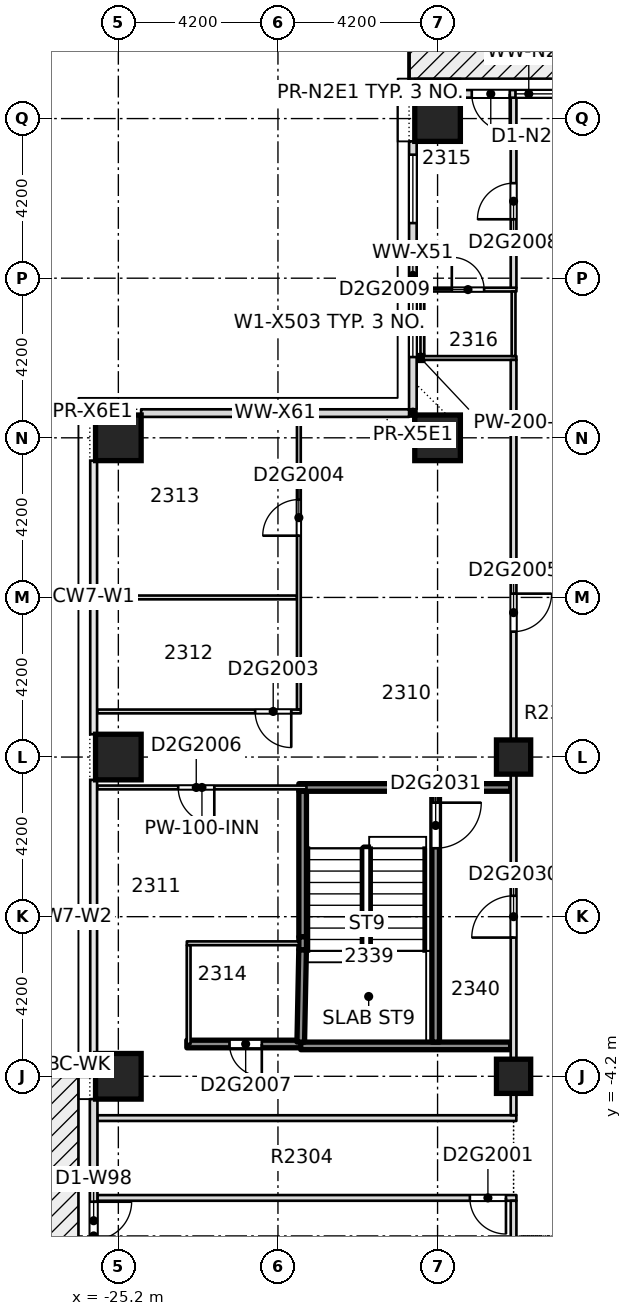
"""IFC4 building model, lengths in metres.
Left out: names, types, materials, properties, quantities, classifications, styles, units other than length and angle.
Written with IfcOpenShell. Run it as: python <this file> out.ifc"""

import sys

from ifc_helpers import new_model, si_unit, direction, frame, frame_2d, origin, origin_2d, place, context, subcontext, project, spatial, rectangle, extrude, element, fill, save


model = new_model("IFC4")
c1 = context("Model", 3, precision=1e-05, world=origin(), true_north=direction((0.0, 1.0)))
c2 = subcontext(c1, "Body", "Model", "MODEL_VIEW")
j1 = project(units=[si_unit("LENGTHUNIT", "METRE"), si_unit("PLANEANGLEUNIT", "RADIAN")], contexts=[c1])
p1 = place(None, origin())
s1 = spatial("IfcSite", under=j1, at=p1, CompositionType="ELEMENT")
p2 = place(p1, origin())
s2 = spatial("IfcBuilding", under=s1, at=p2, CompositionType="ELEMENT")
p3 = place(p2, frame((0.0, 0.0, 94.2)))
s3 = spatial("IfcBuildingStorey", under=s2, at=p3, CompositionType="ELEMENT", Elevation=94.2)
for number, where, z_axis, x_axis in (
    (1, (-25.2, -4.2, -0.32), (0.0, 0.0, 1.0), (1.0, 0.0, 0.0)),
    (2, (-25.2, 4.2, -0.32), (0.0, 0.0, 1.0), (1.0, 0.0, 0.0)),
    (3, (-25.2, 12.6, -0.32), (0.0, 0.0, 1.0), (1.0, 0.0, 0.0)),
    (4, (-16.8, 12.6, -0.32), (0.0, 0.0, 1.0), (1.0, 0.0, 0.0)),
    (5, (-16.8, 21.0, -0.32), (0.0, 0.0, 1.0), (1.0, 0.0, 0.0)),
):
    element("IfcColumn", number, at=place(p3, frame(where, z_axis=z_axis, x_axis=x_axis)), inside=s3, PredefinedType="COLUMN", context=c2, shape_type="SweptSolid", body=[
        extrude(rectangle(XDim=1.2, YDim=1.2, at=origin_2d()), origin(), (0.0, 0.0, 1.0), 3.45),
    ])
for number, where, z_axis, x_axis in (
    (6, (-14.8, -4.2, -0.32), (0.0, 0.0, 1.0), (1.0, 0.0, 0.0)),
    (7, (-14.8, 4.2, -0.32), (0.0, 0.0, 1.0), (1.0, 0.0, 0.0)),
):
    element("IfcColumn", number, at=place(p3, frame(where, z_axis=z_axis, x_axis=x_axis)), inside=s3, PredefinedType="COLUMN", context=c2, shape_type="SweptSolid", body=[
        extrude(rectangle(XDim=0.9, YDim=0.9, at=origin_2d()), origin(), (0.0, 0.0, 1.0), 3.45),
    ])
p4 = place(p3, frame((-25.75, -7.4, 0.0), z_axis=(0.0, 0.0, 1.0), x_axis=(1.0, 0.0, 0.0)))
e8 = element("IfcWall", 8, at=p4, inside=s3, PredefinedType="PARTITIONING", context=c2, shape_type="SweptSolid", body=[
    extrude(rectangle(XDim=11.025, YDim=0.15, at=frame_2d((5.512, 0.0))), origin(), (0.0, 0.0, 1.0), 3.13),
])
p5 = place(p4, frame((9.8, 0.0, 0.0)))
e9 = element("IfcOpeningElement", 9, at=p5, cuts=e8, PredefinedType="OPENING", context=c2, shape_type="SweptSolid", body=[
    extrude(rectangle(XDim=0.95, YDim=2.1, at=frame_2d((0.475, 1.05))), frame((0.0, 0.085, 0.0), z_axis=(0.0, -1.0, 0.0), x_axis=(1.0, 0.0, 0.0)), (0.0, 0.0, 1.0), 0.17),
])
p6 = place(p3, frame((-25.75, -5.3, 0.0), z_axis=(0.0, 0.0, 1.0), x_axis=(1.0, 0.0, 0.0)))
e10 = element("IfcWall", 10, at=p6, inside=s3, PredefinedType="PARTITIONING", context=c2, shape_type="SweptSolid", body=[
    extrude(rectangle(XDim=11.023, YDim=0.15, at=frame_2d((5.511, 0.0))), origin(), (0.0, 0.0, 1.0), 3.13),
])
p7 = place(p3, frame((-23.398, -3.35, 0.0), z_axis=(0.0, 0.0, 1.0), x_axis=(1.0, 0.0, 0.0)))
e11 = element("IfcWall", 11, at=p7, inside=s3, PredefinedType="SOLIDWALL", context=c2, shape_type="SweptSolid", body=[
    extrude(rectangle(XDim=3.098, YDim=0.2, at=frame_2d((1.549, 0.0))), origin(), (0.0, 0.0, 1.0), 3.13),
])
p8 = place(p7, frame((1.123, 0.0, 0.0)))
e12 = element("IfcOpeningElement", 12, at=p8, cuts=e11, PredefinedType="OPENING", context=c2, shape_type="SweptSolid", body=[
    extrude(rectangle(XDim=0.85, YDim=2.1, at=frame_2d((0.425, 1.05))), frame((0.0, 0.11, 0.0), z_axis=(0.0, -1.0, 0.0), x_axis=(1.0, 0.0, 0.0)), (0.0, 0.0, 1.0), 0.22),
])
p9 = place(p3, frame((-20.4, -3.4, 0.0), z_axis=(0.0, 0.0, 1.0), x_axis=(1.0, 0.0, 0.0)))
e13 = element("IfcWall", 13, at=p9, inside=s3, PredefinedType="SOLIDWALL", context=c2, shape_type="SweptSolid", body=[
    extrude(rectangle(XDim=5.523, YDim=0.2, at=frame_2d((2.761, 0.0))), origin(), (0.0, 0.0, 1.0), 3.13),
])
p10 = place(p3, frame((-23.398, -0.7, 0.0), z_axis=(0.0, 0.0, 1.0), x_axis=(1.0, 0.0, 0.0)))
e14 = element("IfcWall", 14, at=p10, inside=s3, PredefinedType="PARTITIONING", context=c2, shape_type="SweptSolid", body=[
    extrude(rectangle(XDim=2.948, YDim=0.1, at=frame_2d((1.474, 0.0))), origin(), (0.0, 0.0, 1.0), 3.13),
])
p11 = place(p3, frame((-25.75, 3.4, 0.0), z_axis=(0.0, 0.0, 1.0), x_axis=(1.0, 0.0, 0.0)))
e15 = element("IfcWall", 15, at=p11, inside=s3, PredefinedType="PARTITIONING", context=c2, shape_type="SweptSolid", body=[
    extrude(rectangle(XDim=5.5, YDim=0.1, at=frame_2d((2.75, 0.0))), origin(), (0.0, 0.0, 1.0), 3.13),
])
p12 = place(p11, frame((2.125, 0.0, 0.0)))
e16 = element("IfcOpeningElement", 16, at=p12, cuts=e15, PredefinedType="OPENING", context=c2, shape_type="SweptSolid", body=[
    extrude(rectangle(XDim=0.95, YDim=2.1, at=frame_2d((0.475, 1.05))), frame((0.0, 0.06, 0.0), z_axis=(0.0, -1.0, 0.0), x_axis=(1.0, 0.0, 0.0)), (0.0, 0.0, 1.0), 0.12),
])
p13 = place(p3, frame((-20.45, 3.4, 0.0), z_axis=(0.0, 0.0, 1.0), x_axis=(1.0, 0.0, 0.0)))
e17 = element("IfcWall", 17, at=p13, inside=s3, PredefinedType="SOLIDWALL", context=c2, shape_type="SweptSolid", body=[
    extrude(rectangle(XDim=5.575, YDim=0.2, at=frame_2d((2.788, 0.0))), origin(), (0.0, 0.0, 1.0), 3.13),
])
p14 = place(p3, frame((-25.75, 5.4, 0.0), z_axis=(0.0, 0.0, 1.0), x_axis=(1.0, 0.0, 0.0)))
e18 = element("IfcWall", 18, at=p14, inside=s3, PredefinedType="PARTITIONING", context=c2, shape_type="SweptSolid", body=[
    extrude(rectangle(XDim=5.35, YDim=0.1, at=frame_2d((2.675, 0.0))), origin(), (0.0, 0.0, 1.0), 3.13),
])
p15 = place(p14, frame((4.15, 0.0, 0.0)))
e19 = element("IfcOpeningElement", 19, at=p15, cuts=e18, PredefinedType="OPENING", context=c2, shape_type="SweptSolid", body=[
    extrude(rectangle(XDim=0.95, YDim=2.1, at=frame_2d((0.475, 1.05))), frame((0.0, 0.06, 0.0), z_axis=(0.0, -1.0, 0.0), x_axis=(1.0, 0.0, 0.0)), (0.0, 0.0, 1.0), 0.12),
])
p16 = place(p3, frame((-25.75, 8.4, 0.0), z_axis=(0.0, 0.0, 1.0), x_axis=(1.0, 0.0, 0.0)))
e20 = element("IfcWall", 20, at=p16, inside=s3, PredefinedType="PARTITIONING", context=c2, shape_type="SweptSolid", body=[
    extrude(rectangle(XDim=5.25, YDim=0.1, at=frame_2d((2.625, 0.0))), origin(), (0.0, 0.0, 1.0), 3.13),
])
p17 = place(p3, frame((-17.35, 14.7, 0.0), z_axis=(0.0, 0.0, 1.0), x_axis=(1.0, 0.0, 0.0)))
e21 = element("IfcWall", 21, at=p17, inside=s3, PredefinedType="PARTITIONING", context=c2, shape_type="SweptSolid", body=[
    extrude(rectangle(XDim=0.2, YDim=0.2, at=frame_2d((0.1, 0.0))), origin(), (0.0, 0.0, 1.0), 3.13),
])
p18 = place(p3, frame((-17.25, 14.7, 0.0), z_axis=(0.0, 0.0, 1.0), x_axis=(1.0, 0.0, 0.0)))
e22 = element("IfcWall", 22, at=p18, inside=s3, PredefinedType="PARTITIONING", context=c2, shape_type="SweptSolid", body=[
    extrude(rectangle(XDim=2.525, YDim=0.1, at=frame_2d((1.262, 0.0))), origin(), (0.0, 0.0, 1.0), 3.13),
])
p19 = place(p3, frame((-17.25, 16.5, 0.0), z_axis=(0.0, 0.0, 1.0), x_axis=(1.0, 0.0, 0.0)))
e23 = element("IfcWall", 23, at=p19, inside=s3, PredefinedType="PARTITIONING", context=c2, shape_type="SweptSolid", body=[
    extrude(rectangle(XDim=2.525, YDim=0.1, at=frame_2d((1.262, 0.0))), origin(), (0.0, 0.0, 1.0), 3.13),
])
p20 = place(p19, frame((0.825, 0.0, 0.0)))
e24 = element("IfcOpeningElement", 24, at=p20, cuts=e23, PredefinedType="OPENING", context=c2, shape_type="SweptSolid", body=[
    extrude(rectangle(XDim=0.85, YDim=2.1, at=frame_2d((0.425, 1.05))), frame((0.0, 0.06, 0.0), z_axis=(0.0, -1.0, 0.0), x_axis=(1.0, 0.0, 0.0)), (0.0, 0.0, 1.0), 0.12),
])
p21 = place(p3, frame((-23.35, -3.348, 0.0), z_axis=(0.0, 0.0, 1.0), x_axis=(0.0, 1.0, 0.0)))
e25 = element("IfcWall", 25, at=p21, inside=s3, PredefinedType="PARTITIONING", context=c2, shape_type="SweptSolid", body=[
    extrude(rectangle(XDim=2.596, YDim=0.1, at=frame_2d((1.298, 0.0))), origin(), (0.0, 0.0, 1.0), 3.13),
])
p22 = place(p3, frame((-20.45, 5.45, 0.0), z_axis=(0.0, 0.0, 1.0), x_axis=(0.0, 1.0, 0.0)))
e26 = element("IfcWall", 26, at=p22, inside=s3, PredefinedType="PARTITIONING", context=c2, shape_type="SweptSolid", body=[
    extrude(rectangle(XDim=7.7, YDim=0.1, at=frame_2d((3.85, 0.0))), origin(), (0.0, 0.0, 1.0), 3.13),
])
p23 = place(p22, frame((4.575, 0.0, 0.0)))
e27 = element("IfcOpeningElement", 27, at=p23, cuts=e26, PredefinedType="OPENING", context=c2, shape_type="SweptSolid", body=[
    extrude(rectangle(XDim=0.95, YDim=2.1, at=frame_2d((0.475, 1.05))), frame((0.0, 0.06, 0.0), z_axis=(0.0, -1.0, 0.0), x_axis=(1.0, 0.0, 0.0)), (0.0, 0.0, 1.0), 0.12),
])
p24 = place(p3, frame((-20.4, -3.3, 0.0), z_axis=(0.0, 0.0, 1.0), x_axis=(0.019989976481, 0.999800180456, 0.0)))
e28 = element("IfcWall", 28, at=p24, inside=s3, PredefinedType="SOLIDWALL", context=c2, shape_type="SweptSolid", body=[
    extrude(rectangle(XDim=2.43, YDim=0.2, at=frame_2d((1.215, 0.0))), origin(), (0.0, 0.0, 1.0), 3.13),
])
p25 = place(p3, frame((-20.35, -0.53, 0.0), z_axis=(0.0, 0.0, 1.0), x_axis=(0.0, 1.0, 0.0)))
e29 = element("IfcWall", 29, at=p25, inside=s3, PredefinedType="SOLIDWALL", context=c2, shape_type="SweptSolid", body=[
    extrude(rectangle(XDim=3.83, YDim=0.2, at=frame_2d((1.915, 0.0))), origin(), (0.0, 0.0, 1.0), 3.13),
])
p26 = place(p3, frame((-17.2, 14.8, 0.0), z_axis=(0.0, 0.0, 1.0), x_axis=(0.0, 1.0, 0.0)))
e30 = element("IfcWall", 30, at=p26, inside=s3, PredefinedType="PARTITIONING", context=c2, shape_type="SweptSolid", body=[
    extrude(rectangle(XDim=1.65, YDim=0.1, at=frame_2d((0.825, 0.0))), origin(), (0.0, 0.0, 1.0), 3.13),
])
p27 = place(p3, frame((-16.85, -3.3, 0.0), z_axis=(0.0, 0.0, 1.0), x_axis=(0.0, 1.0, 0.0)))
e31 = element("IfcWall", 31, at=p27, inside=s3, PredefinedType="SOLIDWALL", context=c2, shape_type="SweptSolid", body=[
    extrude(rectangle(XDim=6.6, YDim=0.2, at=frame_2d((3.3, 0.0))), origin(), (0.0, 0.0, 1.0), 3.13),
])
p28 = place(p27, frame((5.1, 0.0, 0.0)))
e32 = element("IfcOpeningElement", 32, at=p28, cuts=e31, PredefinedType="OPENING", context=c2, shape_type="SweptSolid", body=[
    extrude(rectangle(XDim=1.2, YDim=2.1, at=frame_2d((0.6, 1.05))), frame((0.0, 0.11, 0.0), z_axis=(0.0, -1.0, 0.0), x_axis=(1.0, 0.0, 0.0)), (0.0, 0.0, 1.0), 0.22),
])
p29 = place(p3, frame((-14.8, -10.6, 0.0), z_axis=(0.0, 0.0, 1.0), x_axis=(0.0, 1.0, 0.0)))
e33 = element("IfcWall", 33, at=p29, inside=s3, PredefinedType="PARTITIONING", context=c2, shape_type="SweptSolid", body=[
    extrude(rectangle(XDim=3.125, YDim=0.15, at=frame_2d((1.562, 0.0))), origin(), (0.0, 0.0, 1.0), 3.13),
])
p30 = place(p3, frame((-14.8, -5.223, 0.0), z_axis=(0.0, 0.0, 1.0), x_axis=(0.0, 1.0, 0.0)))
e34 = element("IfcWall", 34, at=p30, inside=s3, PredefinedType="PARTITIONING", context=c2, shape_type="SweptSolid", body=[
    extrude(rectangle(XDim=19.873, YDim=0.15, at=frame_2d((9.937, 0.0))), origin(), (0.0, 0.0, 1.0), 3.13),
])
p31 = place(p30, frame((12.723, 0.0, 0.0)))
e35 = element("IfcOpeningElement", 35, at=p31, cuts=e34, PredefinedType="OPENING", context=c2, shape_type="SweptSolid", body=[
    extrude(rectangle(XDim=1.0, YDim=2.1, at=frame_2d((0.5, 1.05))), frame((0.0, 0.085, 0.0), z_axis=(0.0, -1.0, 0.0), x_axis=(1.0, 0.0, 0.0)), (0.0, 0.0, 1.0), 0.17),
])
p32 = place(p30, frame((4.673, 0.0, 0.0)))
e36 = element("IfcOpeningElement", 36, at=p32, cuts=e34, PredefinedType="OPENING", context=c2, shape_type="SweptSolid", body=[
    extrude(rectangle(XDim=1.1, YDim=2.1, at=frame_2d((0.55, 1.05))), frame((0.0, 0.085, 0.0), z_axis=(0.0, -1.0, 0.0), x_axis=(1.0, 0.0, 0.0)), (0.0, 0.0, 1.0), 0.17),
])
p33 = place(p3, frame((-14.8, 14.75, 0.0), z_axis=(0.0, 0.0, 1.0), x_axis=(0.0, 1.0, 0.0)))
e37 = element("IfcWall", 37, at=p33, inside=s3, PredefinedType="PARTITIONING", context=c2, shape_type="SweptSolid", body=[
    extrude(rectangle(XDim=1.7, YDim=0.1, at=frame_2d((0.85, 0.0))), origin(), (0.0, 0.0, 1.0), 3.13),
])
p34 = place(p3, frame((-14.8, 16.55, 0.0), z_axis=(0.0, 0.0, 1.0), x_axis=(0.0, 1.0, 0.0)))
e38 = element("IfcWall", 38, at=p34, inside=s3, PredefinedType="PARTITIONING", context=c2, shape_type="SweptSolid", body=[
    extrude(rectangle(XDim=5.0, YDim=0.15, at=frame_2d((2.5, 0.0))), origin(), (0.0, 0.0, 1.0), 3.13),
])
p35 = place(p34, frame((1.8, 0.0, 0.0)))
e39 = element("IfcOpeningElement", 39, at=p35, cuts=e38, PredefinedType="OPENING", context=c2, shape_type="SweptSolid", body=[
    extrude(rectangle(XDim=0.95, YDim=2.1, at=frame_2d((0.475, 1.05))), frame((0.0, 0.085, 0.0), z_axis=(0.0, -1.0, 0.0), x_axis=(1.0, 0.0, 0.0)), (0.0, 0.0, 1.0), 0.17),
])
p36 = place(p3, frame((-12.6, 21.65, 0.0), z_axis=(0.0, 0.0, 1.0), x_axis=(-1.0, 0.0, 0.0)))
e40 = element("IfcWall", 40, at=p36, inside=s3, PredefinedType="STANDARD", context=c2, shape_type="SweptSolid", body=[
    extrude(rectangle(XDim=3.6, YDim=0.2, at=frame_2d((1.8, 0.0))), origin(), (0.0, 0.0, 1.0), 3.13),
])
p37 = place(p36, frame((0.35, 0.0, 0.2)))
e41 = element("IfcOpeningElement", 41, at=p37, cuts=e40, PredefinedType="OPENING", context=c2, shape_type="SweptSolid", body=[
    extrude(rectangle(XDim=1.8, YDim=2.65, at=frame_2d((0.9, 1.325))), frame((0.0, 0.11, 0.0), z_axis=(0.0, -1.0, 0.0), x_axis=(1.0, 0.0, 0.0)), (0.0, 0.0, 1.0), 0.22),
])
p38 = place(p36, frame((2.3, 0.0, 0.0)))
e42 = element("IfcOpeningElement", 42, at=p38, cuts=e40, PredefinedType="OPENING", context=c2, shape_type="SweptSolid", body=[
    extrude(rectangle(XDim=1.0, YDim=2.4, at=frame_2d((0.5, 1.2))), frame((0.0, 0.11, 0.0), z_axis=(0.0, -1.0, 0.0), x_axis=(1.0, 0.0, 0.0)), (0.0, 0.0, 1.0), 0.22),
])
p39 = place(p3, frame((-17.45, 20.4, 0.0), z_axis=(0.0, 0.0, 1.0), x_axis=(0.0, -1.0, 0.0)))
e43 = element("IfcWall", 43, at=p39, inside=s3, PredefinedType="STANDARD", context=c2, shape_type="SweptSolid", body=[
    extrude(rectangle(XDim=7.05, YDim=0.2, at=frame_2d((3.525, 0.0))), origin(), (0.0, 0.0, 1.0), 3.13),
])
p40 = place(p39, frame((3.875, 0.0, 0.2)))
e44 = element("IfcOpeningElement", 44, at=p40, cuts=e43, PredefinedType="OPENING", context=c2, shape_type="SweptSolid", body=[
    extrude(rectangle(XDim=1.8, YDim=2.65, at=frame_2d((0.9, 1.325))), frame((0.0, 0.11, 0.0), z_axis=(0.0, -1.0, 0.0), x_axis=(1.0, 0.0, 0.0)), (0.0, 0.0, 1.0), 0.22),
])
p41 = place(p39, frame((0.35, 0.0, 0.2)))
e45 = element("IfcOpeningElement", 45, at=p41, cuts=e43, PredefinedType="OPENING", context=c2, shape_type="SweptSolid", body=[
    extrude(rectangle(XDim=1.8, YDim=2.65, at=frame_2d((0.9, 1.325))), frame((0.0, 0.11, 0.0), z_axis=(0.0, -1.0, 0.0), x_axis=(1.0, 0.0, 0.0)), (0.0, 0.0, 1.0), 0.22),
])
p42 = place(p3, frame((-17.55, 13.25, 0.0), z_axis=(0.0, 0.0, 1.0), x_axis=(-1.0, 0.0, 0.0)))
e46 = element("IfcWall", 46, at=p42, inside=s3, PredefinedType="STANDARD", context=c2, shape_type="SweptSolid", body=[
    extrude(rectangle(XDim=7.05, YDim=0.2, at=frame_2d((3.525, 0.0))), origin(), (0.0, 0.0, 1.0), 3.13),
])
p43 = place(p3, frame((-25.85, -4.8, 0.0), z_axis=(0.0, 0.0, 1.0), x_axis=(0.0, -1.0, 0.0)))
e47 = element("IfcWall", 47, at=p43, inside=s3, PredefinedType="STANDARD", context=c2, shape_type="SweptSolid", body=[
    extrude(rectangle(XDim=7.2, YDim=0.2, at=frame_2d((3.6, 0.0))), origin(), (0.0, 0.0, 1.0), 3.13),
])
p44 = place(p43, frame((3.95, 0.0, 0.2)))
e48 = element("IfcOpeningElement", 48, at=p44, cuts=e47, PredefinedType="OPENING", context=c2, shape_type="SweptSolid", body=[
    extrude(rectangle(XDim=1.8, YDim=2.65, at=frame_2d((0.9, 1.325))), frame((0.0, 0.11, 0.0), z_axis=(0.0, -1.0, 0.0), x_axis=(1.0, 0.0, 0.0)), (0.0, 0.0, 1.0), 0.22),
])
p45 = place(p43, frame((5.85, 0.0, 0.0)))
e49 = element("IfcOpeningElement", 49, at=p45, cuts=e47, PredefinedType="OPENING", context=c2, shape_type="SweptSolid", body=[
    extrude(rectangle(XDim=1.0, YDim=2.4, at=frame_2d((0.5, 1.2))), frame((0.0, 0.11, 0.0), z_axis=(0.0, -1.0, 0.0), x_axis=(1.0, 0.0, 0.0)), (0.0, 0.0, 1.0), 0.22),
])
p46 = place(p43, frame((2.7, 0.0, 0.0)))
e50 = element("IfcOpeningElement", 50, at=p46, cuts=e47, PredefinedType="OPENING", context=c2, shape_type="SweptSolid", body=[
    extrude(rectangle(XDim=1.0, YDim=2.4, at=frame_2d((0.5, 1.2))), frame((0.0, 0.11, 0.0), z_axis=(0.0, -1.0, 0.0), x_axis=(1.0, 0.0, 0.0)), (0.0, 0.0, 1.0), 0.22),
])
p47 = place(p3, frame((-20.35, -0.87, 0.0), z_axis=(0.0, 0.0, 1.0), x_axis=(0.0, 1.0, 0.0)))
e51 = element("IfcWall", 51, at=p47, inside=s3, PredefinedType="SOLIDWALL", context=c2, shape_type="SweptSolid", body=[
    extrude(rectangle(XDim=0.34, YDim=0.2, at=frame_2d((0.17, 0.0))), origin(), (0.0, 0.0, 1.0), 3.13),
])
p48 = place(p5, origin())
e52 = element("IfcDoor", 52, at=p48, inside=s3, OperationType="SINGLE_SWING_RIGHT", PredefinedType="DOOR", context=c2, shape_type="SweptSolid", body=[
    extrude(rectangle(XDim=0.95, YDim=2.1, at=frame_2d((0.475, 1.05))), frame((0.0, 0.025, 0.0), z_axis=(0.0, -1.0, 0.0), x_axis=(1.0, 0.0, 0.0)), (0.0, 0.0, 1.0), 0.05),
])
fill(e9, e52)
p49 = place(p15, origin())
e53 = element("IfcDoor", 53, at=p49, inside=s3, OperationType="SINGLE_SWING_LEFT", PredefinedType="DOOR", context=c2, shape_type="SweptSolid", body=[
    extrude(rectangle(XDim=0.95, YDim=2.1, at=frame_2d((0.475, 1.05))), frame((0.0, 0.025, 0.0), z_axis=(0.0, -1.0, 0.0), x_axis=(1.0, 0.0, 0.0)), (0.0, 0.0, 1.0), 0.05),
])
fill(e19, e53)
p50 = place(p23, origin())
e54 = element("IfcDoor", 54, at=p50, inside=s3, OperationType="SINGLE_SWING_LEFT", PredefinedType="DOOR", context=c2, shape_type="SweptSolid", body=[
    extrude(rectangle(XDim=0.95, YDim=2.1, at=frame_2d((0.475, 1.05))), frame((0.0, 0.025, 0.0), z_axis=(0.0, -1.0, 0.0), x_axis=(1.0, 0.0, 0.0)), (0.0, 0.0, 1.0), 0.05),
])
fill(e27, e54)
p51 = place(p31, origin())
e55 = element("IfcDoor", 55, at=p51, inside=s3, OperationType="SINGLE_SWING_RIGHT", PredefinedType="DOOR", context=c2, shape_type="SweptSolid", body=[
    extrude(rectangle(XDim=1.0, YDim=2.1, at=frame_2d((0.5, 1.05))), frame((0.0, 0.025, 0.0), z_axis=(0.0, -1.0, 0.0), x_axis=(1.0, 0.0, 0.0)), (0.0, 0.0, 1.0), 0.05),
])
fill(e35, e55)
p52 = place(p12, origin())
e56 = element("IfcDoor", 56, at=p52, inside=s3, OperationType="SINGLE_SWING_LEFT", PredefinedType="DOOR", context=c2, shape_type="SweptSolid", body=[
    extrude(rectangle(XDim=0.95, YDim=2.1, at=frame_2d((0.475, 1.05))), frame((0.0, 0.025, 0.0), z_axis=(0.0, -1.0, 0.0), x_axis=(1.0, 0.0, 0.0)), (0.0, 0.0, 1.0), 0.05),
])
fill(e16, e56)
p53 = place(p8, origin())
e57 = element("IfcDoor", 57, at=p53, inside=s3, OperationType="SINGLE_SWING_LEFT", PredefinedType="DOOR", context=c2, shape_type="SweptSolid", body=[
    extrude(rectangle(XDim=0.85, YDim=2.1, at=frame_2d((0.425, 1.05))), frame((0.0, 0.025, 0.0), z_axis=(0.0, -1.0, 0.0), x_axis=(1.0, 0.0, 0.0)), (0.0, 0.0, 1.0), 0.05),
])
fill(e12, e57)
p54 = place(p35, origin())
e58 = element("IfcDoor", 58, at=p54, inside=s3, OperationType="SINGLE_SWING_RIGHT", PredefinedType="DOOR", context=c2, shape_type="SweptSolid", body=[
    extrude(rectangle(XDim=0.95, YDim=2.1, at=frame_2d((0.475, 1.05))), frame((0.0, 0.025, 0.0), z_axis=(0.0, -1.0, 0.0), x_axis=(1.0, 0.0, 0.0)), (0.0, 0.0, 1.0), 0.05),
])
fill(e39, e58)
p55 = place(p20, origin())
e59 = element("IfcDoor", 59, at=p55, inside=s3, OperationType="SINGLE_SWING_RIGHT", PredefinedType="DOOR", context=c2, shape_type="SweptSolid", body=[
    extrude(rectangle(XDim=0.85, YDim=2.1, at=frame_2d((0.425, 1.05))), frame((0.0, 0.025, 0.0), z_axis=(0.0, -1.0, 0.0), x_axis=(1.0, 0.0, 0.0)), (0.0, 0.0, 1.0), 0.05),
])
fill(e24, e59)
p56 = place(p32, origin())
e60 = element("IfcDoor", 60, at=p56, inside=s3, OperationType="SINGLE_SWING_LEFT", PredefinedType="DOOR", context=c2, shape_type="SweptSolid", body=[
    extrude(rectangle(XDim=1.1, YDim=2.1, at=frame_2d((0.55, 1.05))), frame((0.0, 0.025, 0.0), z_axis=(0.0, -1.0, 0.0), x_axis=(1.0, 0.0, 0.0)), (0.0, 0.0, 1.0), 0.05),
])
fill(e36, e60)
p57 = place(p28, origin())
e61 = element("IfcDoor", 61, at=p57, inside=s3, OperationType="SINGLE_SWING_RIGHT", PredefinedType="DOOR", context=c2, shape_type="SweptSolid", body=[
    extrude(rectangle(XDim=1.2, YDim=2.1, at=frame_2d((0.6, 1.05))), frame((0.0, 0.025, 0.0), z_axis=(0.0, -1.0, 0.0), x_axis=(1.0, 0.0, 0.0)), (0.0, 0.0, 1.0), 0.05),
])
fill(e32, e61)
p58 = place(p37, origin())
e62 = element("IfcWindow", 62, at=p58, inside=s3, PartitioningType="SINGLE_PANEL", PredefinedType="WINDOW", context=c2, shape_type="SweptSolid", body=[
    extrude(rectangle(XDim=1.8, YDim=2.65, at=frame_2d((0.9, 1.325))), frame((0.0, 0.03, 0.0), z_axis=(0.0, -1.0, 0.0), x_axis=(1.0, 0.0, 0.0)), (0.0, 0.0, 1.0), 0.06),
])
fill(e41, e62)
p59 = place(p38, origin())
e63 = element("IfcDoor", 63, at=p59, inside=s3, OperationType="SINGLE_SWING_LEFT", PredefinedType="DOOR", context=c2, shape_type="SweptSolid", body=[
    extrude(rectangle(XDim=1.0, YDim=2.4, at=frame_2d((0.5, 1.2))), frame((0.0, 0.025, 0.0), z_axis=(0.0, -1.0, 0.0), x_axis=(1.0, 0.0, 0.0)), (0.0, 0.0, 1.0), 0.05),
])
fill(e42, e63)
p60 = place(p40, origin())
e64 = element("IfcWindow", 64, at=p60, inside=s3, PartitioningType="SINGLE_PANEL", PredefinedType="WINDOW", context=c2, shape_type="SweptSolid", body=[
    extrude(rectangle(XDim=1.8, YDim=2.65, at=frame_2d((0.9, 1.325))), frame((0.0, 0.03, 0.0), z_axis=(0.0, -1.0, 0.0), x_axis=(1.0, 0.0, 0.0)), (0.0, 0.0, 1.0), 0.06),
])
fill(e44, e64)
p61 = place(p41, origin())
e65 = element("IfcWindow", 65, at=p61, inside=s3, PartitioningType="SINGLE_PANEL", PredefinedType="WINDOW", context=c2, shape_type="SweptSolid", body=[
    extrude(rectangle(XDim=1.8, YDim=2.65, at=frame_2d((0.9, 1.325))), frame((0.0, 0.03, 0.0), z_axis=(0.0, -1.0, 0.0), x_axis=(1.0, 0.0, 0.0)), (0.0, 0.0, 1.0), 0.06),
])
fill(e45, e65)
p62 = place(p46, origin())
e66 = element("IfcDoor", 66, at=p62, inside=s3, OperationType="SINGLE_SWING_LEFT", PredefinedType="DOOR", context=c2, shape_type="SweptSolid", body=[
    extrude(rectangle(XDim=1.0, YDim=2.4, at=frame_2d((0.5, 1.2))), frame((0.0, 0.025, 0.0), z_axis=(0.0, -1.0, 0.0), x_axis=(1.0, 0.0, 0.0)), (0.0, 0.0, 1.0), 0.05),
])
fill(e50, e66)
save(model, sys.argv[1])
